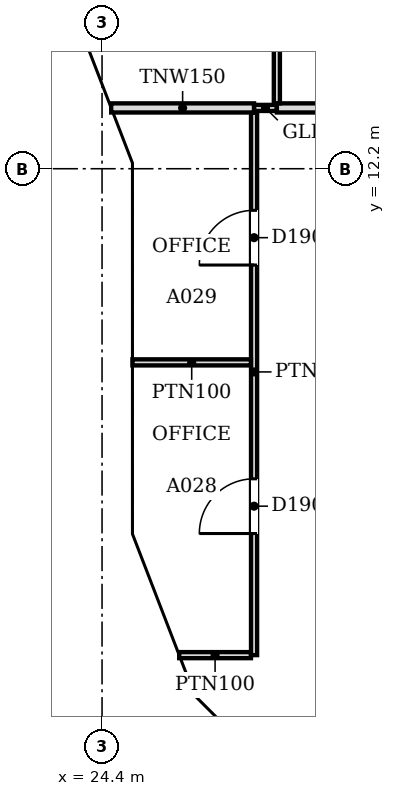
"""IFC4 building model, lengths in metres.
Left out: names, types, materials, properties, quantities, classifications, styles, units other than length and angle.
Written with IfcOpenShell. Run it as: python <this file> out.ifc"""

import sys

from ifc_helpers import new_model, si_unit, direction, frame, frame_2d, origin, place, context, subcontext, project, spatial, polyline, rectangle, outline, extrude, faceted_brep, source, transform, mapped, element, fill, save


model = new_model("IFC4")
c1 = context("Model", 3, precision=1e-05, world=origin(), true_north=direction((0.0, 1.0)))
c2 = subcontext(c1, "Body", "Model", "MODEL_VIEW")
j1 = project(units=[si_unit("LENGTHUNIT", "METRE"), si_unit("PLANEANGLEUNIT", "RADIAN")], contexts=[c1])
p1 = place(None, origin())
s1 = spatial("IfcSite", under=j1, at=p1, CompositionType="ELEMENT")
p2 = place(p1, origin())
s2 = spatial("IfcBuilding", under=s1, at=p2, CompositionType="ELEMENT")
p3 = place(p2, frame((0.0, 0.0, 120.2)))
s3 = spatial("IfcBuildingStorey", under=s2, at=p3, CompositionType="ELEMENT", Elevation=120.2)
m1 = source(origin(), c2, "Body", "Brep", [
    faceted_brep([(0.106, -0.25, 0.064), (3.156, -0.25, 3.744), (3.156, -0.25, 3.856), (0.106, -0.25, 7.536), (0.0, 0.25, 7.536), (0.053, 0.25, 7.6), (3.202, 0.25, 3.8), (0.053, 0.25, 0.0), (0.0, 0.25, 0.064), (3.202, -0.0, 3.8), (0.053, 0.0, 0.0), (0.053, 0.0, 7.6)], [[[0, 1, 2, 3]], [[4, 5, 6, 7, 8]], [[7, 6, 9, 1, 0, 10]], [[6, 5, 11, 3, 2, 9]], [[5, 4, 11]], [[8, 7, 10]], [[8, 10, 0, 3, 11, 4]], [[1, 9, 2]]]),
])
p4 = place(p3, frame((23.497, 15.234, -3.8), z_axis=(0.0, 0.0, 1.0), x_axis=(0.359913782069, -0.932985567668, 0.0)))
e1 = element("IfcWall", 1, at=p4, inside=s3, PredefinedType="SOLIDWALL", context=c2, shape_type="MappedRepresentation", body=[
    mapped(m1, transform((0.0, 0.0, 0.0), scale=1.0)),
])
m2 = source(origin(), c2, "Body", "SweptSolid", [
    extrude(outline(polyline([(0.253, 0.633), (2.878, 3.8), (0.253, 6.967), (0.253, 0.633)])), frame((0.0, 0.26, 0.0), z_axis=(0.0, -1.0, 0.0), x_axis=(1.0, 0.0, 0.0)), (0.0, 0.0, 1.0), 0.52),
])
p5 = place(p4, origin())
e2 = element("IfcOpeningElement", 2, at=p5, cuts=e1, PredefinedType="OPENING", context=c2, shape_type="MappedRepresentation", body=[
    mapped(m2, transform((0.0, 0.0, 0.0), scale=1.0)),
])
m3 = source(origin(), c2, "Body", "Brep", [
    faceted_brep([(3.096, -0.25, 0.0), (6.1, -0.25, 3.8), (3.096, -0.25, 7.6), (0.047, -0.25, 3.857), (0.047, -0.25, 3.743), (0.0, 0.25, 3.8), (3.096, 0.25, 7.6), (6.053, 0.25, 3.859), (6.053, 0.25, 3.741), (3.096, 0.25, 0.0), (6.1, -0.0, 3.8), (0.0, 0.0, 3.8)], [[[0, 1, 2, 3, 4]], [[5, 6, 7, 8, 9]], [[9, 8, 10, 1, 0]], [[7, 6, 2, 1, 10]], [[6, 5, 11, 3, 2]], [[5, 9, 0, 4, 11]], [[11, 4, 3]], [[10, 8, 7]]]),
])
p6 = place(p3, frame((24.65, 12.247, -3.8), z_axis=(0.0, 0.0, 1.0), x_axis=(0.0, -1.0, 0.0)))
e3 = element("IfcWall", 3, at=p6, inside=s3, PredefinedType="SOLIDWALL", context=c2, shape_type="MappedRepresentation", body=[
    mapped(m3, transform((0.0, 0.0, 0.0), scale=1.0)),
])
m4 = source(origin(), c2, "Body", "SweptSolid", [
    extrude(outline(polyline([(3.094, 0.399), (5.781, 3.8), (3.094, 7.201), (0.323, 3.8), (3.094, 0.399)])), frame((0.0, 0.26, 0.0), z_axis=(0.0, -1.0, 0.0), x_axis=(1.0, 0.0, 0.0)), (0.0, 0.0, 1.0), 0.52),
])
p7 = place(p6, origin())
e4 = element("IfcOpeningElement", 4, at=p7, cuts=e3, PredefinedType="OPENING", context=c2, shape_type="MappedRepresentation", body=[
    mapped(m4, transform((0.0, 0.0, 0.0), scale=1.0)),
])
m5 = source(origin(), c2, "Body", "Brep", [
    faceted_brep([(2.95, -0.25, 0.0), (3.003, -0.25, 0.068), (3.003, -0.25, 7.532), (2.95, -0.25, 7.6), (0.0, -0.25, 3.8), (0.047, 0.25, 3.86), (2.898, 0.25, 7.532), (2.898, 0.25, 0.068), (0.047, 0.25, 3.74), (2.95, 0.0, 0.0), (2.95, 0.0, 7.6), (0.0, 0.0, 3.8)], [[[0, 1, 2, 3, 4]], [[5, 6, 7, 8]], [[1, 0, 9]], [[10, 3, 2]], [[6, 5, 11, 4, 3, 10]], [[8, 7, 9, 0, 4, 11]], [[8, 11, 5]], [[1, 9, 7, 6, 10, 2]]]),
])
p8 = place(p3, frame((24.65, 6.146, -3.8), z_axis=(0.0, 0.0, 1.0), x_axis=(0.359953949349, -0.932970071518, 0.0)))
e5 = element("IfcWall", 5, at=p8, inside=s3, PredefinedType="SOLIDWALL", context=c2, shape_type="MappedRepresentation", body=[
    mapped(m5, transform((0.0, 0.0, 0.0), scale=1.0)),
])
m6 = source(origin(), c2, "Body", "SweptSolid", [
    extrude(outline(polyline([(2.75, 6.935), (0.316, 3.8), (2.75, 0.665), (2.75, 6.935)])), frame((0.0, 0.26, 0.0), z_axis=(0.0, -1.0, 0.0), x_axis=(1.0, 0.0, 0.0)), (0.0, 0.0, 1.0), 0.52),
])
p9 = place(p8, origin())
e6 = element("IfcOpeningElement", 6, at=p9, cuts=e5, PredefinedType="OPENING", context=c2, shape_type="MappedRepresentation", body=[
    mapped(m6, transform((0.0, 0.0, 0.0), scale=1.0)),
])
m7 = source(origin(), c2, "Body", "Brep", [
    faceted_brep([(0.053, -0.25, 0.0), (2.997, -0.25, 3.8), (0.053, -0.25, 7.6), (0.0, -0.25, 7.532), (0.0, -0.25, 0.068), (0.106, 0.25, 7.532), (2.944, 0.25, 3.868), (2.944, 0.25, 3.732), (0.106, 0.25, 0.068), (2.997, 0.0, 3.8), (0.053, 0.0, 0.0), (0.053, 0.0, 7.6)], [[[0, 1, 2, 3, 4]], [[5, 6, 7, 8]], [[8, 7, 9, 1, 0, 10]], [[6, 5, 11, 2, 1, 9]], [[3, 2, 11]], [[10, 0, 4]], [[8, 10, 4, 3, 11, 5]], [[9, 7, 6]]]),
])
p10 = place(p3, frame((25.675, 3.431, -3.8), z_axis=(0.0, 0.0, 1.0), x_axis=(0.707106781187, -0.707106781187, 0.0)))
e7 = element("IfcWall", 7, at=p10, inside=s3, PredefinedType="SOLIDWALL", context=c2, shape_type="MappedRepresentation", body=[
    mapped(m7, transform((0.0, 0.0, 0.0), scale=1.0)),
])
m8 = source(origin(), c2, "Body", "SweptSolid", [
    extrude(outline(polyline([(0.253, 0.667), (2.681, 3.8), (0.253, 6.934), (0.253, 0.667)])), frame((0.0, 0.26, 0.0), z_axis=(0.0, -1.0, 0.0), x_axis=(1.0, 0.0, 0.0)), (0.0, 0.0, 1.0), 0.52),
])
p11 = place(p10, origin())
e8 = element("IfcOpeningElement", 8, at=p11, cuts=e7, PredefinedType="OPENING", context=c2, shape_type="MappedRepresentation", body=[
    mapped(m8, transform((0.0, 0.0, 0.0), scale=1.0)),
])
p12 = place(p2, frame((0.0, 0.0, 124.0)))
s4 = spatial("IfcBuildingStorey", under=s2, at=p12, CompositionType="ELEMENT", Elevation=124.0)
m9 = source(origin(), c2, "Body", "Brep", [
    faceted_brep([(3.103, -0.25, 7.544), (0.053, -0.25, 3.864), (0.053, -0.25, 3.736), (3.103, -0.25, 0.056), (0.0, 0.25, 3.8), (3.149, 0.25, 7.6), (3.196, 0.25, 7.543), (3.196, 0.25, 0.057), (3.149, 0.25, 0.0), (3.149, -0.0, 0.0), (3.149, -0.0, 7.6), (0.0, 0.0, 3.8)], [[[0, 1, 2, 3]], [[4, 5, 6, 7, 8]], [[8, 7, 9]], [[6, 5, 10]], [[5, 4, 11, 1, 0, 10]], [[4, 8, 9, 3, 2, 11]], [[11, 2, 1]], [[3, 9, 7, 6, 10, 0]]]),
])
p13 = place(p12, frame((23.517, 15.185, -3.8), z_axis=(0.0, 0.0, 1.0), x_axis=(0.359864468756, -0.933004589553, 0.0)))
e9 = element("IfcWall", 9, at=p13, inside=s4, PredefinedType="SOLIDWALL", context=c2, shape_type="MappedRepresentation", body=[
    mapped(m9, transform((0.0, 0.0, 0.0), scale=1.0)),
])
m10 = source(origin(), c2, "Body", "SweptSolid", [
    extrude(outline(polyline([(2.949, 6.967), (0.325, 3.8), (2.949, 0.633), (2.949, 6.967)])), frame((0.0, 0.26, 0.0), z_axis=(0.0, -1.0, 0.0), x_axis=(1.0, 0.0, 0.0)), (0.0, 0.0, 1.0), 0.52),
])
p14 = place(p13, origin())
e10 = element("IfcOpeningElement", 10, at=p14, cuts=e9, PredefinedType="OPENING", context=c2, shape_type="MappedRepresentation", body=[
    mapped(m10, transform((0.0, 0.0, 0.0), scale=1.0)),
])
m11 = source(origin(), c2, "Body", "Brep", [
    faceted_brep([(0.093, -0.25, 0.057), (3.143, -0.25, 3.8), (0.093, -0.25, 7.543), (0.0, 0.25, 7.544), (0.047, 0.25, 7.6), (3.143, 0.25, 3.8), (0.047, 0.25, 0.0), (0.0, 0.25, 0.056), (0.047, 0.0, 0.0), (0.047, 0.0, 7.6)], [[[0, 1, 2]], [[3, 4, 5, 6, 7]], [[6, 5, 1, 0, 8]], [[5, 4, 9, 2, 1]], [[4, 3, 9]], [[7, 6, 8]], [[7, 8, 0, 2, 9, 3]]]),
])
p15 = place(p12, frame((24.65, 12.293, -3.8), z_axis=(0.0, 0.0, 1.0), x_axis=(0.0, -1.0, 0.0)))
e11 = element("IfcWall", 11, at=p15, inside=s4, PredefinedType="SOLIDWALL", context=c2, shape_type="MappedRepresentation", body=[
    mapped(m11, transform((0.0, 0.0, 0.0), scale=1.0)),
])
m12 = source(origin(), c2, "Body", "SweptSolid", [
    extrude(outline(polyline([(0.247, 0.641), (2.821, 3.8), (0.247, 6.959), (0.247, 0.641)])), frame((0.0, 0.26, 0.0), z_axis=(0.0, -1.0, 0.0), x_axis=(1.0, 0.0, 0.0)), (0.0, 0.0, 1.0), 0.52),
])
p16 = place(p15, origin())
e12 = element("IfcOpeningElement", 12, at=p16, cuts=e11, PredefinedType="OPENING", context=c2, shape_type="MappedRepresentation", body=[
    mapped(m12, transform((0.0, 0.0, 0.0), scale=1.0)),
])
m13 = source(origin(), c2, "Body", "Brep", [
    faceted_brep([(3.003, -0.25, 0.0), (3.05, -0.25, 0.06), (3.05, -0.25, 7.54), (3.003, -0.25, 7.6), (0.0, -0.25, 3.8), (0.0, 0.25, 3.8), (2.957, 0.25, 7.541), (2.957, 0.25, 0.059), (3.003, 0.0, 0.0), (3.003, 0.0, 7.6)], [[[0, 1, 2, 3, 4]], [[5, 6, 7]], [[1, 0, 8]], [[9, 3, 2]], [[6, 5, 4, 3, 9]], [[5, 7, 8, 0, 4]], [[1, 8, 7, 6, 9, 2]]]),
])
p17 = place(p12, frame((24.65, 9.15, -3.8), z_axis=(0.0, 0.0, 1.0), x_axis=(0.0, -1.0, 0.0)))
e13 = element("IfcWall", 13, at=p17, inside=s4, PredefinedType="SOLIDWALL", context=c2, shape_type="MappedRepresentation", body=[
    mapped(m13, transform((0.0, 0.0, 0.0), scale=1.0)),
])
m14 = source(origin(), c2, "Body", "SweptSolid", [
    extrude(outline(polyline([(2.803, 6.944), (0.319, 3.8), (2.803, 0.656), (2.803, 6.944)])), frame((0.0, 0.26, 0.0), z_axis=(0.0, -1.0, 0.0), x_axis=(1.0, 0.0, 0.0)), (0.0, 0.0, 1.0), 0.52),
])
p18 = place(p17, origin())
e14 = element("IfcOpeningElement", 14, at=p18, cuts=e13, PredefinedType="OPENING", context=c2, shape_type="MappedRepresentation", body=[
    mapped(m14, transform((0.0, 0.0, 0.0), scale=1.0)),
])
m15 = source(origin(), c2, "Body", "Brep", [
    faceted_brep([(0.047, -0.25, 0.0), (2.997, -0.25, 3.8), (0.047, -0.25, 7.6), (0.0, -0.25, 7.541), (0.0, -0.25, 0.059), (0.093, 0.25, 7.54), (2.944, 0.25, 3.868), (2.944, 0.25, 3.732), (0.093, 0.25, 0.06), (2.997, 0.0, 3.8), (0.047, 0.0, 0.0), (0.047, 0.0, 7.6)], [[[0, 1, 2, 3, 4]], [[5, 6, 7, 8]], [[8, 7, 9, 1, 0, 10]], [[6, 5, 11, 2, 1, 9]], [[3, 2, 11]], [[10, 0, 4]], [[8, 10, 4, 3, 11, 5]], [[9, 7, 6]]]),
])
p19 = place(p12, frame((24.633, 6.19, -3.8), z_axis=(0.0, 0.0, 1.0), x_axis=(0.359901446078, -0.932990326376, 0.0)))
e15 = element("IfcWall", 15, at=p19, inside=s4, PredefinedType="SOLIDWALL", context=c2, shape_type="MappedRepresentation", body=[
    mapped(m15, transform((0.0, 0.0, 0.0), scale=1.0)),
])
m16 = source(origin(), c2, "Body", "SweptSolid", [
    extrude(outline(polyline([(0.247, 0.665), (2.681, 3.8), (0.247, 6.935), (0.247, 0.665)])), frame((0.0, 0.26, 0.0), z_axis=(0.0, -1.0, 0.0), x_axis=(1.0, 0.0, 0.0)), (0.0, 0.0, 1.0), 0.52),
])
p20 = place(p19, origin())
e16 = element("IfcOpeningElement", 16, at=p20, cuts=e15, PredefinedType="OPENING", context=c2, shape_type="MappedRepresentation", body=[
    mapped(m16, transform((0.0, 0.0, 0.0), scale=1.0)),
])
m17 = source(origin(), c2, "Body", "Brep", [
    faceted_brep([(2.944, -0.25, 0.0), (2.997, -0.25, 0.068), (2.997, -0.25, 7.532), (2.944, -0.25, 7.6), (0.0, -0.25, 3.8), (0.053, 0.25, 3.868), (2.891, 0.25, 7.532), (2.891, 0.25, 0.068), (0.053, 0.25, 3.732), (2.944, 0.0, 0.0), (2.944, 0.0, 7.6), (0.0, 0.0, 3.8)], [[[0, 1, 2, 3, 4]], [[5, 6, 7, 8]], [[1, 0, 9]], [[10, 3, 2]], [[6, 5, 11, 4, 3, 10]], [[8, 7, 9, 0, 4, 11]], [[8, 11, 5]], [[1, 9, 7, 6, 10, 2]]]),
])
p21 = place(p12, frame((25.712, 3.394, -3.8), z_axis=(0.0, 0.0, 1.0), x_axis=(0.707066050402, -0.707147509625, 0.0)))
e17 = element("IfcWall", 17, at=p21, inside=s4, PredefinedType="SOLIDWALL", context=c2, shape_type="MappedRepresentation", body=[
    mapped(m17, transform((0.0, 0.0, 0.0), scale=1.0)),
])
m18 = source(origin(), c2, "Body", "SweptSolid", [
    extrude(outline(polyline([(2.744, 6.934), (0.316, 3.8), (2.744, 0.666), (2.744, 6.934)])), frame((0.0, 0.26, 0.0), z_axis=(0.0, -1.0, 0.0), x_axis=(1.0, 0.0, 0.0)), (0.0, 0.0, 1.0), 0.52),
])
p22 = place(p21, origin())
e18 = element("IfcOpeningElement", 18, at=p22, cuts=e17, PredefinedType="OPENING", context=c2, shape_type="MappedRepresentation", body=[
    mapped(m18, transform((0.0, 0.0, 0.0), scale=1.0)),
])
p23 = place(p3, frame((25.669, 4.2, 0.0), z_axis=(0.0, 0.0, 1.0), x_axis=(1.0, 0.0, 0.0)))
e19 = element("IfcWall", 19, at=p23, inside=s3, PredefinedType="PARTITIONING", context=c2, shape_type="SweptSolid", body=[
    extrude(rectangle(XDim=1.18, YDim=0.1, at=frame_2d((0.59, 0.0))), origin(), (0.0, 0.0, 1.0), 3.067),
])
p24 = place(p3, frame((26.9, 4.2, 0.0), z_axis=(0.0, 0.0, 1.0), x_axis=(0.0, 1.0, 0.0)))
e20 = element("IfcWall", 20, at=p24, inside=s3, PredefinedType="PARTITIONING", context=c2, shape_type="SweptSolid", body=[
    extrude(rectangle(XDim=8.924, YDim=0.1, at=frame_2d((4.462, 0.0))), origin(), (0.0, 0.0, 1.0), 3.067),
])
m19 = source(origin(), c2, "Body", "SweptSolid", [
    extrude(rectangle(XDim=0.9, YDim=2.1, at=frame_2d((0.45, 1.05))), frame((0.0, 0.06, 0.0), z_axis=(0.0, -1.0, 0.0), x_axis=(1.0, 0.0, 0.0)), (0.0, 0.0, 1.0), 0.12),
])
p25 = place(p24, frame((6.416, 0.0, 0.0)))
e21 = element("IfcOpeningElement", 21, at=p25, cuts=e20, PredefinedType="OPENING", context=c2, shape_type="MappedRepresentation", body=[
    mapped(m19, transform((0.0, 0.0, 0.0), scale=1.0)),
])
p26 = place(p24, frame((2.0, 0.0, 0.0)))
e22 = element("IfcOpeningElement", 22, at=p26, cuts=e20, PredefinedType="OPENING", context=c2, shape_type="MappedRepresentation", body=[
    mapped(m19, transform((0.0, 0.0, 0.0), scale=1.0)),
])
p27 = place(p3, frame((24.9, 9.015, 0.0), z_axis=(0.0, 0.0, 1.0), x_axis=(1.0, 0.0, 0.0)))
e23 = element("IfcWall", 23, at=p27, inside=s3, PredefinedType="PARTITIONING", context=c2, shape_type="SweptSolid", body=[
    extrude(rectangle(XDim=1.949, YDim=0.1, at=frame_2d((0.975, 0.0))), origin(), (0.0, 0.0, 1.0), 3.067),
])
p28 = place(p3, frame((24.55, 13.2, 0.0), z_axis=(0.0, 0.0, 1.0), x_axis=(1.0, 0.0, 0.0)))
e24 = element("IfcWall", 24, at=p28, inside=s3, PredefinedType="PARTITIONING", context=c2, shape_type="SweptSolid", body=[
    extrude(rectangle(XDim=2.35, YDim=0.15, at=frame_2d((1.175, 0.0))), origin(), (0.0, 0.0, 1.0), 3.067),
])
p29 = place(p3, frame((26.901, 13.2, 0.0), z_axis=(0.0, 0.0, 1.0), x_axis=(1.0, 0.0, 0.0)))
e25 = element("IfcWall", 25, at=p29, inside=s3, PredefinedType="PARTITIONING", context=c2, shape_type="SweptSolid", body=[
    extrude(rectangle(XDim=0.373, YDim=0.1, at=frame_2d((0.187, 0.0))), origin(), (0.0, 0.0, 1.0), 3.067),
])
p30 = place(p3, frame((27.275, 13.2, 0.0), z_axis=(0.0, 0.0, 1.0), x_axis=(1.0, 0.0, 0.0)))
e26 = element("IfcWall", 26, at=p30, inside=s3, PredefinedType="PARTITIONING", context=c2, shape_type="SweptSolid", body=[
    extrude(rectangle(XDim=16.649, YDim=0.15, at=frame_2d((8.325, 0.0))), origin(), (0.0, 0.0, 1.0), 3.067),
])
p31 = place(p3, frame((27.275, 13.276, 0.0), z_axis=(0.0, 0.0, 1.0), x_axis=(0.0, 1.0, 0.0)))
e27 = element("IfcWall", 27, at=p31, inside=s3, PredefinedType="PARTITIONING", context=c2, shape_type="SweptSolid", body=[
    extrude(rectangle(XDim=5.448, YDim=0.1, at=frame_2d((2.724, 0.0))), origin(), (0.0, 0.0, 1.0), 3.067),
])
p32 = place(p31, frame((2.3, 0.0, 0.0)))
e28 = element("IfcOpeningElement", 28, at=p32, cuts=e27, PredefinedType="OPENING", context=c2, shape_type="MappedRepresentation", body=[
    mapped(m19, transform((0.0, 0.0, 0.0), scale=1.0)),
])
m20 = source(origin(), c2, "Body", "SweptSolid", [
    extrude(rectangle(XDim=0.9, YDim=2.1, at=frame_2d((0.45, 1.05))), frame((0.0, 0.025, 0.0), z_axis=(0.0, -1.0, 0.0), x_axis=(1.0, 0.0, 0.0)), (0.0, 0.0, 1.0), 0.05),
])
p33 = place(p25, origin())
e29 = element("IfcDoor", 29, at=p33, inside=s3, OperationType="SINGLE_SWING_LEFT", PredefinedType="DOOR", context=c2, shape_type="MappedRepresentation", body=[
    mapped(m20, transform((0.0, 0.0, 0.0), scale=1.0)),
])
fill(e21, e29)
p34 = place(p26, origin())
e30 = element("IfcDoor", 30, at=p34, inside=s3, OperationType="SINGLE_SWING_LEFT", PredefinedType="DOOR", context=c2, shape_type="MappedRepresentation", body=[
    mapped(m20, transform((0.0, 0.0, 0.0), scale=1.0)),
])
fill(e22, e30)
save(model, sys.argv[1])
